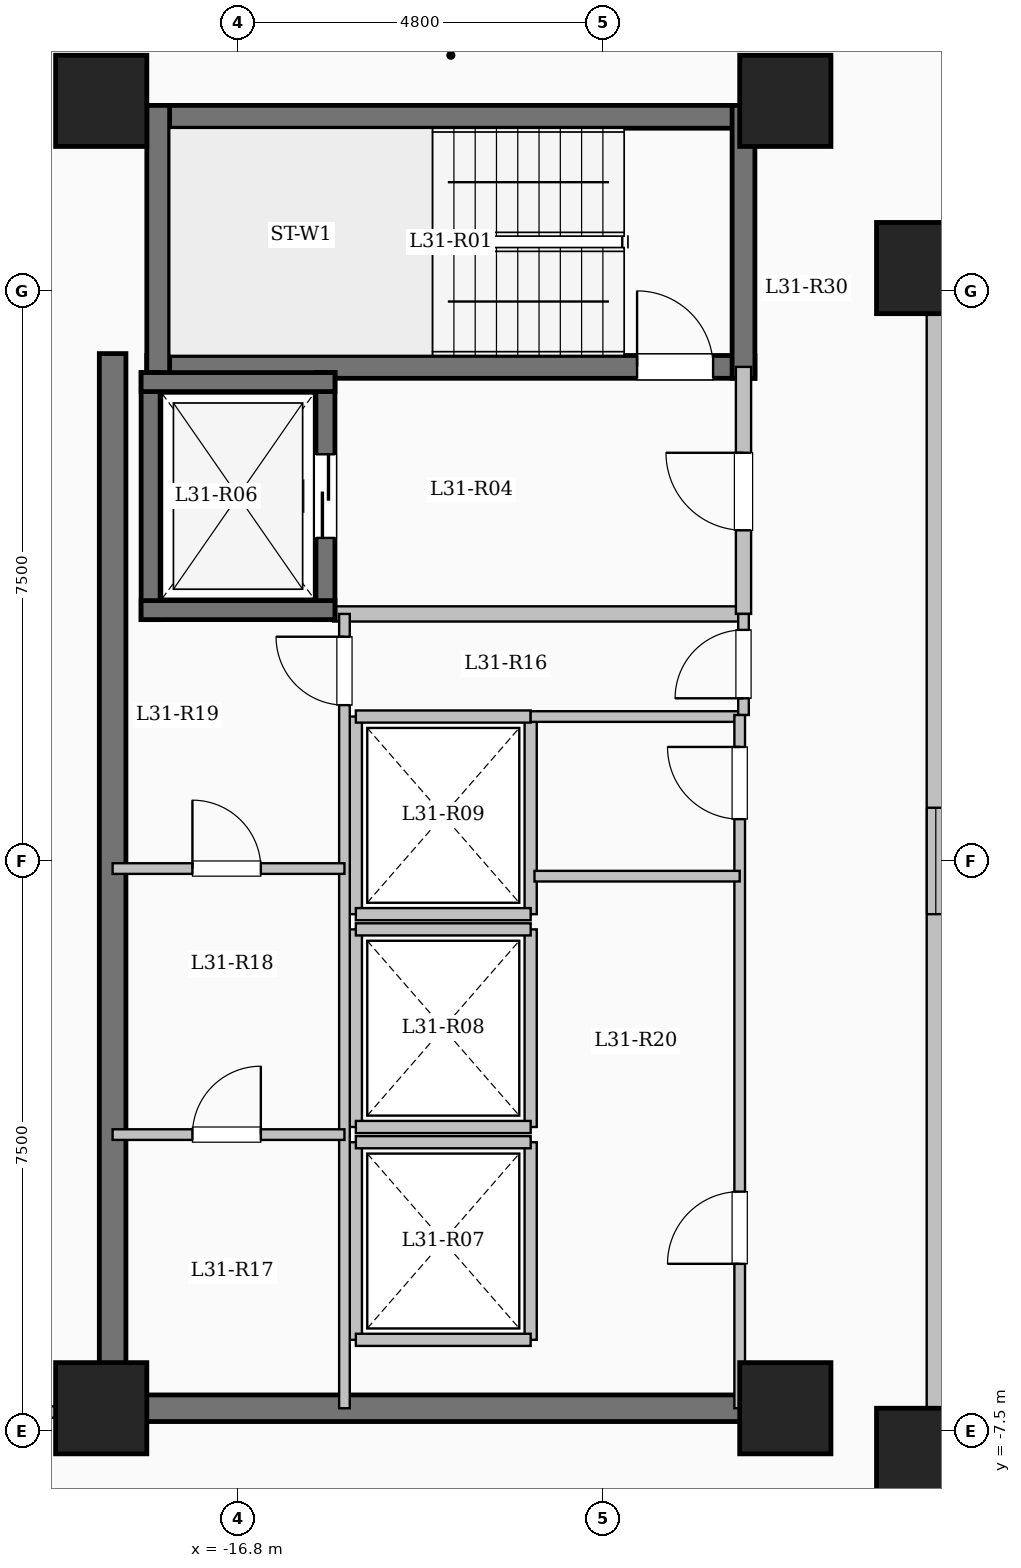
"""IFC4 building model, lengths in metres.
Left out: names, types, materials, properties, quantities, classifications, styles, units other than length and angle.
Written with IfcOpenShell. Run it as: python <this file> out.ifc"""

import sys

from ifc_helpers import new_model, si_unit, direction, frame, frame_2d, origin, origin_2d, place, context, subcontext, project, spatial, rectangle, extrude, element, fill, save


model = new_model("IFC4")
c1 = context("Model", 3, precision=1e-05, world=origin(), true_north=direction((0.0, 1.0)))
c2 = subcontext(c1, "Body", "Model", "MODEL_VIEW")
j1 = project(units=[si_unit("LENGTHUNIT", "METRE"), si_unit("PLANEANGLEUNIT", "RADIAN")], contexts=[c1])
p1 = place(None, origin())
s1 = spatial("IfcSite", under=j1, at=p1, CompositionType="ELEMENT")
p2 = place(p1, origin())
s2 = spatial("IfcBuilding", under=s1, at=p2, CompositionType="ELEMENT")
p3 = place(p2, frame((0.0, 0.0, 115.15)))
s3 = spatial("IfcBuildingStorey", under=s2, at=p3, CompositionType="ELEMENT", Elevation=115.15)
for number, where, z_axis, x_axis in (
    (1, (-7.8, -7.8, 0.0), (0.0, 0.0, 1.0), (1.0, 0.0, 0.0)),
    (2, (-7.8, 7.8, 0.0), (0.0, 0.0, 1.0), (1.0, 0.0, 0.0)),
    (3, (-9.6, -7.2, 0.0), (0.0, 0.0, 1.0), (1.0, 0.0, 0.0)),
    (4, (-9.6, 10.0, 0.0), (0.0, 0.0, 1.0), (1.0, 0.0, 0.0)),
    (5, (-18.6, -7.2, 0.0), (0.0, 0.0, 1.0), (1.0, 0.0, 0.0)),
    (6, (-18.6, 10.0, 0.0), (0.0, 0.0, 1.0), (1.0, 0.0, 0.0)),
):
    element("IfcColumn", number, at=place(p3, frame(where, z_axis=z_axis, x_axis=x_axis)), inside=s3, PredefinedType="COLUMN", context=c2, shape_type="SweptSolid", body=[
        extrude(rectangle(XDim=1.2, YDim=1.2, at=origin_2d()), origin(), (0.0, 0.0, 1.0), 3.35),
    ])
p4 = place(p3, frame((-7.62, -7.62, 0.0), z_axis=(0.0, 0.0, 1.0), x_axis=(1.0, 0.0, 0.0)))
e7 = element("IfcWall", 7, at=p4, inside=s3, PredefinedType="SOLIDWALL", context=c2, shape_type="SweptSolid", body=[
    extrude(rectangle(XDim=15.24, YDim=0.24, at=frame_2d((7.62, 0.0))), origin(), (0.0, 0.0, 1.0), 3.05),
])
p5 = place(p4, frame((6.92, 0.0, 0.95)))
e8 = element("IfcOpeningElement", 8, at=p5, cuts=e7, PredefinedType="OPENING", context=c2, shape_type="SweptSolid", body=[
    extrude(rectangle(XDim=1.4, YDim=1.5, at=frame_2d((0.7, 0.75))), frame((0.0, 0.13, 0.0), z_axis=(0.0, -1.0, 0.0), x_axis=(1.0, 0.0, 0.0)), (0.0, 0.0, 1.0), 0.26),
])
p6 = place(p3, frame((7.62, 7.62, 0.0), z_axis=(0.0, 0.0, 1.0), x_axis=(-1.0, 0.0, 0.0)))
e9 = element("IfcWall", 9, at=p6, inside=s3, PredefinedType="SOLIDWALL", context=c2, shape_type="SweptSolid", body=[
    extrude(rectangle(XDim=15.24, YDim=0.24, at=frame_2d((7.62, 0.0))), origin(), (0.0, 0.0, 1.0), 3.05),
])
p7 = place(p6, frame((6.92, 0.0, 0.95)))
e10 = element("IfcOpeningElement", 10, at=p7, cuts=e9, PredefinedType="OPENING", context=c2, shape_type="SweptSolid", body=[
    extrude(rectangle(XDim=1.4, YDim=1.5, at=frame_2d((0.7, 0.75))), frame((0.0, 0.13, 0.0), z_axis=(0.0, -1.0, 0.0), x_axis=(1.0, 0.0, 0.0)), (0.0, 0.0, 1.0), 0.26),
])
p8 = place(p3, frame((-7.62, 7.62, 0.0), z_axis=(0.0, 0.0, 1.0), x_axis=(0.0, -1.0, 0.0)))
e11 = element("IfcWall", 11, at=p8, inside=s3, PredefinedType="SOLIDWALL", context=c2, shape_type="SweptSolid", body=[
    extrude(rectangle(XDim=15.24, YDim=0.24, at=frame_2d((7.62, 0.0))), origin(), (0.0, 0.0, 1.0), 3.05),
])
p9 = place(p8, frame((6.92, 0.0, 0.95)))
e12 = element("IfcOpeningElement", 12, at=p9, cuts=e11, PredefinedType="OPENING", context=c2, shape_type="SweptSolid", body=[
    extrude(rectangle(XDim=1.4, YDim=1.5, at=frame_2d((0.7, 0.75))), frame((0.0, 0.13, 0.0), z_axis=(0.0, -1.0, 0.0), x_axis=(1.0, 0.0, 0.0)), (0.0, 0.0, 1.0), 0.26),
])
p10 = place(p3, frame((-18.0, 9.79, 0.0), z_axis=(0.0, 0.0, 1.0), x_axis=(1.0, 0.0, 0.0)))
e13 = element("IfcWall", 13, at=p10, inside=s3, PredefinedType="SHEAR", context=c2, shape_type="SweptSolid", body=[
    extrude(rectangle(XDim=8.0, YDim=0.3, at=frame_2d((4.0, 0.0))), origin(), (0.0, 0.0, 1.0), 3.35),
])
p11 = place(p3, frame((-18.0, 6.5, 0.0), z_axis=(0.0, 0.0, 1.0), x_axis=(1.0, 0.0, 0.0)))
e14 = element("IfcWall", 14, at=p11, inside=s3, PredefinedType="SHEAR", context=c2, shape_type="SweptSolid", body=[
    extrude(rectangle(XDim=8.0, YDim=0.3, at=frame_2d((4.0, 0.0))), origin(), (0.0, 0.0, 1.0), 3.35),
])
p12 = place(p11, frame((6.45, 0.0, 0.0)))
e15 = element("IfcOpeningElement", 15, at=p12, cuts=e14, PredefinedType="OPENING", context=c2, shape_type="SweptSolid", body=[
    extrude(rectangle(XDim=1.0, YDim=2.15, at=frame_2d((0.5, 1.075))), frame((0.0, 0.16, 0.0), z_axis=(0.0, -1.0, 0.0), x_axis=(1.0, 0.0, 0.0)), (0.0, 0.0, 1.0), 0.32),
])
for number, where, z_axis, x_axis in (
    (16, (-17.85, 6.35, 0.0), (0.0, 0.0, 1.0), (0.0, 1.0, 0.0)),
    (17, (-10.15, 6.35, 0.0), (0.0, 0.0, 1.0), (0.0, 1.0, 0.0)),
):
    element("IfcWall", number, at=place(p3, frame(where, z_axis=z_axis, x_axis=x_axis)), inside=s3, PredefinedType="SHEAR", context=c2, shape_type="SweptSolid", body=[
        extrude(rectangle(XDim=3.59, YDim=0.3, at=frame_2d((1.795, 0.0))), origin(), (0.0, 0.0, 1.0), 3.35),
    ])
p13 = place(p3, frame((-15.55, 3.25, 0.0), z_axis=(0.0, 0.0, 1.0), x_axis=(1.0, 0.0, 0.0)))
e18 = element("IfcWall", 18, at=p13, inside=s3, PredefinedType="SOLIDWALL", context=c2, shape_type="SweptSolid", body=[
    extrude(rectangle(XDim=5.4, YDim=0.2, at=frame_2d((2.7, 0.0))), origin(), (0.0, 0.0, 1.0), 3.05),
])
p14 = place(p3, frame((-10.15, 3.25, 0.0), z_axis=(0.0, 0.0, 1.0), x_axis=(0.0, 1.0, 0.0)))
e19 = element("IfcWall", 19, at=p14, inside=s3, PredefinedType="SOLIDWALL", context=c2, shape_type="SweptSolid", body=[
    extrude(rectangle(XDim=3.25, YDim=0.2, at=frame_2d((1.625, 0.0))), origin(), (0.0, 0.0, 1.0), 3.05),
])
p15 = place(p14, frame((1.1, 0.0, 0.0)))
e20 = element("IfcOpeningElement", 20, at=p15, cuts=e19, PredefinedType="OPENING", context=c2, shape_type="SweptSolid", body=[
    extrude(rectangle(XDim=1.02, YDim=2.15, at=frame_2d((0.51, 1.075))), frame((0.0, 0.11, 0.0), z_axis=(0.0, -1.0, 0.0), x_axis=(1.0, 0.0, 0.0)), (0.0, 0.0, 1.0), 0.22),
])
p16 = place(p3, frame((-17.95, 3.175, 0.0), z_axis=(0.0, 0.0, 1.0), x_axis=(0.0, 1.0, 0.0)))
e21 = element("IfcWall", 21, at=p16, inside=s3, PredefinedType="SHEAR", context=c2, shape_type="SweptSolid", body=[
    extrude(rectangle(XDim=3.25, YDim=0.25, at=frame_2d((1.625, 0.0))), origin(), (0.0, 0.0, 1.0), 3.35),
])
p17 = place(p3, frame((-15.65, 3.175, 0.0), z_axis=(0.0, 0.0, 1.0), x_axis=(0.0, 1.0, 0.0)))
e22 = element("IfcWall", 22, at=p17, inside=s3, PredefinedType="SHEAR", context=c2, shape_type="SweptSolid", body=[
    extrude(rectangle(XDim=3.25, YDim=0.25, at=frame_2d((1.625, 0.0))), origin(), (0.0, 0.0, 1.0), 3.35),
])
p18 = place(p17, frame((1.075, 0.0, 0.0)))
e23 = element("IfcOpeningElement", 23, at=p18, cuts=e22, PredefinedType="OPENING", context=c2, shape_type="SweptSolid", body=[
    extrude(rectangle(XDim=1.1, YDim=2.15, at=frame_2d((0.55, 1.075))), frame((0.0, 0.135, 0.0), z_axis=(0.0, -1.0, 0.0), x_axis=(1.0, 0.0, 0.0)), (0.0, 0.0, 1.0), 0.27),
])
for number, where, z_axis, x_axis in (
    (24, (-18.075, 3.3, 0.0), (0.0, 0.0, 1.0), (1.0, 0.0, 0.0)),
    (25, (-18.075, 6.3, 0.0), (0.0, 0.0, 1.0), (1.0, 0.0, 0.0)),
):
    element("IfcWall", number, at=place(p3, frame(where, z_axis=z_axis, x_axis=x_axis)), inside=s3, PredefinedType="SHEAR", context=c2, shape_type="SweptSolid", body=[
        extrude(rectangle(XDim=2.55, YDim=0.25, at=frame_2d((1.275, 0.0))), origin(), (0.0, 0.0, 1.0), 3.35),
    ])
for number, where, z_axis, x_axis in (
    (26, (-15.25, -6.3, 0.0), (0.0, 0.0, 1.0), (0.0, 1.0, 0.0)),
    (27, (-12.95, -6.3, 0.0), (0.0, 0.0, 1.0), (0.0, 1.0, 0.0)),
):
    element("IfcWall", number, at=place(p3, frame(where, z_axis=z_axis, x_axis=x_axis)), inside=s3, PredefinedType="SOLIDWALL", context=c2, shape_type="SweptSolid", body=[
        extrude(rectangle(XDim=2.6, YDim=0.16, at=frame_2d((1.3, 0.0))), origin(), (0.0, 0.0, 1.0), 3.05),
    ])
for number, where, z_axis, x_axis in (
    (28, (-15.25, -6.3, 0.0), (0.0, 0.0, 1.0), (1.0, 0.0, 0.0)),
    (29, (-15.25, -3.7, 0.0), (0.0, 0.0, 1.0), (1.0, 0.0, 0.0)),
):
    element("IfcWall", number, at=place(p3, frame(where, z_axis=z_axis, x_axis=x_axis)), inside=s3, PredefinedType="SOLIDWALL", context=c2, shape_type="SweptSolid", body=[
        extrude(rectangle(XDim=2.3, YDim=0.16, at=frame_2d((1.15, 0.0))), origin(), (0.0, 0.0, 1.0), 3.05),
    ])
for number, where, z_axis, x_axis in (
    (30, (-15.25, -3.5, 0.0), (0.0, 0.0, 1.0), (0.0, 1.0, 0.0)),
    (31, (-12.95, -3.5, 0.0), (0.0, 0.0, 1.0), (0.0, 1.0, 0.0)),
):
    element("IfcWall", number, at=place(p3, frame(where, z_axis=z_axis, x_axis=x_axis)), inside=s3, PredefinedType="SOLIDWALL", context=c2, shape_type="SweptSolid", body=[
        extrude(rectangle(XDim=2.6, YDim=0.16, at=frame_2d((1.3, 0.0))), origin(), (0.0, 0.0, 1.0), 3.05),
    ])
for number, where, z_axis, x_axis in (
    (32, (-15.25, -3.5, 0.0), (0.0, 0.0, 1.0), (1.0, 0.0, 0.0)),
    (33, (-15.25, -0.9, 0.0), (0.0, 0.0, 1.0), (1.0, 0.0, 0.0)),
):
    element("IfcWall", number, at=place(p3, frame(where, z_axis=z_axis, x_axis=x_axis)), inside=s3, PredefinedType="SOLIDWALL", context=c2, shape_type="SweptSolid", body=[
        extrude(rectangle(XDim=2.3, YDim=0.16, at=frame_2d((1.15, 0.0))), origin(), (0.0, 0.0, 1.0), 3.05),
    ])
for number, where, z_axis, x_axis in (
    (34, (-15.25, -0.7, 0.0), (0.0, 0.0, 1.0), (0.0, 1.0, 0.0)),
    (35, (-12.95, -0.7, 0.0), (0.0, 0.0, 1.0), (0.0, 1.0, 0.0)),
):
    element("IfcWall", number, at=place(p3, frame(where, z_axis=z_axis, x_axis=x_axis)), inside=s3, PredefinedType="SOLIDWALL", context=c2, shape_type="SweptSolid", body=[
        extrude(rectangle(XDim=2.6, YDim=0.16, at=frame_2d((1.3, 0.0))), origin(), (0.0, 0.0, 1.0), 3.05),
    ])
for number, where, z_axis, x_axis in (
    (36, (-15.25, -0.7, 0.0), (0.0, 0.0, 1.0), (1.0, 0.0, 0.0)),
    (37, (-15.25, 1.9, 0.0), (0.0, 0.0, 1.0), (1.0, 0.0, 0.0)),
):
    element("IfcWall", number, at=place(p3, frame(where, z_axis=z_axis, x_axis=x_axis)), inside=s3, PredefinedType="SOLIDWALL", context=c2, shape_type="SweptSolid", body=[
        extrude(rectangle(XDim=2.3, YDim=0.16, at=frame_2d((1.15, 0.0))), origin(), (0.0, 0.0, 1.0), 3.05),
    ])
p19 = place(p3, frame((-18.45, -7.375, 0.0), z_axis=(0.0, 0.0, 1.0), x_axis=(0.0, 1.0, 0.0)))
e38 = element("IfcWall", 38, at=p19, inside=s3, PredefinedType="SHEAR", context=c2, shape_type="SweptSolid", body=[
    extrude(rectangle(XDim=14.05, YDim=0.35, at=frame_2d((7.025, 0.0))), origin(), (0.0, 0.0, 1.0), 3.35),
])
p20 = place(p3, frame((-18.625, -7.2, 0.0), z_axis=(0.0, 0.0, 1.0), x_axis=(1.0, 0.0, 0.0)))
e39 = element("IfcWall", 39, at=p20, inside=s3, PredefinedType="SHEAR", context=c2, shape_type="SweptSolid", body=[
    extrude(rectangle(XDim=8.55, YDim=0.35, at=frame_2d((4.275, 0.0))), origin(), (0.0, 0.0, 1.0), 3.35),
])
p21 = place(p3, frame((-12.95, 1.9, 0.0), z_axis=(0.0, 0.0, 1.0), x_axis=(1.0, 0.0, 0.0)))
e40 = element("IfcWall", 40, at=p21, inside=s3, PredefinedType="PARTITIONING", context=c2, shape_type="SweptSolid", body=[
    extrude(rectangle(XDim=2.8, YDim=0.14, at=frame_2d((1.4, 0.0))), origin(), (0.0, 0.0, 1.0), 3.05),
])
p22 = place(p3, frame((-10.15, 1.92, 0.0), z_axis=(0.0, 0.0, 1.0), x_axis=(0.0, 1.0, 0.0)))
e41 = element("IfcWall", 41, at=p22, inside=s3, PredefinedType="PARTITIONING", context=c2, shape_type="SweptSolid", body=[
    extrude(rectangle(XDim=1.33, YDim=0.14, at=frame_2d((0.665, 0.0))), origin(), (0.0, 0.0, 1.0), 3.05),
])
p23 = place(p22, frame((0.22, 0.0, 0.0)))
e42 = element("IfcOpeningElement", 42, at=p23, cuts=e41, PredefinedType="OPENING", context=c2, shape_type="SweptSolid", body=[
    extrude(rectangle(XDim=0.9, YDim=2.08, at=frame_2d((0.45, 1.04))), frame((0.0, 0.08, 0.0), z_axis=(0.0, -1.0, 0.0), x_axis=(1.0, 0.0, 0.0)), (0.0, 0.0, 1.0), 0.16),
])
p24 = place(p3, frame((-15.4, -7.2, 0.0), z_axis=(0.0, 0.0, 1.0), x_axis=(0.0, 1.0, 0.0)))
e43 = element("IfcWall", 43, at=p24, inside=s3, PredefinedType="PARTITIONING", context=c2, shape_type="SweptSolid", body=[
    extrude(rectangle(XDim=10.45, YDim=0.14, at=frame_2d((5.225, 0.0))), origin(), (0.0, 0.0, 1.0), 3.05),
])
p25 = place(p24, frame((9.25, 0.0, 0.0)))
e44 = element("IfcOpeningElement", 44, at=p25, cuts=e43, PredefinedType="OPENING", context=c2, shape_type="SweptSolid", body=[
    extrude(rectangle(XDim=0.9, YDim=2.08, at=frame_2d((0.45, 1.04))), frame((0.0, 0.08, 0.0), z_axis=(0.0, -1.0, 0.0), x_axis=(1.0, 0.0, 0.0)), (0.0, 0.0, 1.0), 0.16),
])
p26 = place(p3, frame((-18.45, -3.6, 0.0), z_axis=(0.0, 0.0, 1.0), x_axis=(1.0, 0.0, 0.0)))
e45 = element("IfcWall", 45, at=p26, inside=s3, PredefinedType="PARTITIONING", context=c2, shape_type="SweptSolid", body=[
    extrude(rectangle(XDim=3.05, YDim=0.14, at=frame_2d((1.525, 0.0))), origin(), (0.0, 0.0, 1.0), 3.05),
])
p27 = place(p26, frame((1.05, 0.0, 0.0)))
e46 = element("IfcOpeningElement", 46, at=p27, cuts=e45, PredefinedType="OPENING", context=c2, shape_type="SweptSolid", body=[
    extrude(rectangle(XDim=0.9, YDim=2.08, at=frame_2d((0.45, 1.04))), frame((0.0, 0.08, 0.0), z_axis=(0.0, -1.0, 0.0), x_axis=(1.0, 0.0, 0.0)), (0.0, 0.0, 1.0), 0.16),
])
p28 = place(p3, frame((-18.45, -0.1, 0.0), z_axis=(0.0, 0.0, 1.0), x_axis=(1.0, 0.0, 0.0)))
e47 = element("IfcWall", 47, at=p28, inside=s3, PredefinedType="PARTITIONING", context=c2, shape_type="SweptSolid", body=[
    extrude(rectangle(XDim=3.05, YDim=0.14, at=frame_2d((1.525, 0.0))), origin(), (0.0, 0.0, 1.0), 3.05),
])
p29 = place(p28, frame((1.05, 0.0, 0.0)))
e48 = element("IfcOpeningElement", 48, at=p29, cuts=e47, PredefinedType="OPENING", context=c2, shape_type="SweptSolid", body=[
    extrude(rectangle(XDim=0.9, YDim=2.08, at=frame_2d((0.45, 1.04))), frame((0.0, 0.08, 0.0), z_axis=(0.0, -1.0, 0.0), x_axis=(1.0, 0.0, 0.0)), (0.0, 0.0, 1.0), 0.16),
])
p30 = place(p3, frame((-10.2, -7.2, 0.0), z_axis=(0.0, 0.0, 1.0), x_axis=(0.0, 1.0, 0.0)))
e49 = element("IfcWall", 49, at=p30, inside=s3, PredefinedType="PARTITIONING", context=c2, shape_type="SweptSolid", body=[
    extrude(rectangle(XDim=9.12, YDim=0.14, at=frame_2d((4.56, 0.0))), origin(), (0.0, 0.0, 1.0), 3.05),
])
p31 = place(p30, frame((1.9, 0.0, 0.0)))
e50 = element("IfcOpeningElement", 50, at=p31, cuts=e49, PredefinedType="OPENING", context=c2, shape_type="SweptSolid", body=[
    extrude(rectangle(XDim=0.95, YDim=2.12, at=frame_2d((0.475, 1.06))), frame((0.0, 0.08, 0.0), z_axis=(0.0, -1.0, 0.0), x_axis=(1.0, 0.0, 0.0)), (0.0, 0.0, 1.0), 0.16),
])
p32 = place(p30, frame((7.75, 0.0, 0.0)))
e51 = element("IfcOpeningElement", 51, at=p32, cuts=e49, PredefinedType="OPENING", context=c2, shape_type="SweptSolid", body=[
    extrude(rectangle(XDim=0.95, YDim=2.12, at=frame_2d((0.475, 1.06))), frame((0.0, 0.08, 0.0), z_axis=(0.0, -1.0, 0.0), x_axis=(1.0, 0.0, 0.0)), (0.0, 0.0, 1.0), 0.16),
])
p33 = place(p3, frame((-12.9, -0.2, 0.0), z_axis=(0.0, 0.0, 1.0), x_axis=(1.0, 0.0, 0.0)))
e52 = element("IfcWall", 52, at=p33, inside=s3, PredefinedType="PARTITIONING", context=c2, shape_type="SweptSolid", body=[
    extrude(rectangle(XDim=2.7, YDim=0.14, at=frame_2d((1.35, 0.0))), origin(), (0.0, 0.0, 1.0), 3.05),
])
p34 = place(p3, frame((-26.88, -7.25, 0.0), z_axis=(0.0, 0.0, 1.0), x_axis=(1.0, 0.0, 0.0)))
e53 = element("IfcWall", 53, at=p34, inside=s3, PredefinedType="PARTITIONING", context=c2, shape_type="SweptSolid", body=[
    extrude(rectangle(XDim=8.43, YDim=0.15, at=frame_2d((4.215, 0.0))), origin(), (0.0, 0.0, 1.0), 3.05),
])
p35 = place(p34, frame((5.23, 0.0, 0.0)))
e54 = element("IfcOpeningElement", 54, at=p35, cuts=e53, PredefinedType="OPENING", context=c2, shape_type="SweptSolid", body=[
    extrude(rectangle(XDim=1.08, YDim=2.15, at=frame_2d((0.54, 1.075))), frame((0.0, 0.085, 0.0), z_axis=(0.0, -1.0, 0.0), x_axis=(1.0, 0.0, 0.0)), (0.0, 0.0, 1.0), 0.17),
])
p36 = place(p9, origin())
e55 = element("IfcWindow", 55, at=p36, inside=s3, PartitioningType="SINGLE_PANEL", PredefinedType="WINDOW", context=c2, shape_type="SweptSolid", body=[
    extrude(rectangle(XDim=1.4, YDim=1.5, at=frame_2d((0.7, 0.75))), frame((0.0, 0.03, 0.0), z_axis=(0.0, -1.0, 0.0), x_axis=(1.0, 0.0, 0.0)), (0.0, 0.0, 1.0), 0.06),
])
fill(e12, e55)
p37 = place(p12, origin())
e56 = element("IfcDoor", 56, at=p37, inside=s3, OperationType="SINGLE_SWING_LEFT", PredefinedType="DOOR", context=c2, shape_type="SweptSolid", body=[
    extrude(rectangle(XDim=1.0, YDim=2.15, at=frame_2d((0.5, 1.075))), frame((0.0, 0.025, 0.0), z_axis=(0.0, -1.0, 0.0), x_axis=(1.0, 0.0, 0.0)), (0.0, 0.0, 1.0), 0.05),
])
fill(e15, e56)
p38 = place(p15, origin())
e57 = element("IfcDoor", 57, at=p38, inside=s3, OperationType="SINGLE_SWING_RIGHT", PredefinedType="DOOR", context=c2, shape_type="SweptSolid", body=[
    extrude(rectangle(XDim=1.02, YDim=2.15, at=frame_2d((0.51, 1.075))), frame((0.0, 0.025, 0.0), z_axis=(0.0, -1.0, 0.0), x_axis=(1.0, 0.0, 0.0)), (0.0, 0.0, 1.0), 0.05),
])
fill(e20, e57)
p39 = place(p18, origin())
e58 = element("IfcDoor", 58, at=p39, inside=s3, OperationType="SLIDING_TO_LEFT", PredefinedType="DOOR", context=c2, shape_type="SweptSolid", body=[
    extrude(rectangle(XDim=1.1, YDim=2.15, at=frame_2d((0.55, 1.075))), frame((0.0, 0.025, 0.0), z_axis=(0.0, -1.0, 0.0), x_axis=(1.0, 0.0, 0.0)), (0.0, 0.0, 1.0), 0.05),
])
fill(e23, e58)
p40 = place(p23, origin())
e59 = element("IfcDoor", 59, at=p40, inside=s3, OperationType="SINGLE_SWING_LEFT", PredefinedType="DOOR", context=c2, shape_type="SweptSolid", body=[
    extrude(rectangle(XDim=0.9, YDim=2.08, at=frame_2d((0.45, 1.04))), frame((0.0, 0.025, 0.0), z_axis=(0.0, -1.0, 0.0), x_axis=(1.0, 0.0, 0.0)), (0.0, 0.0, 1.0), 0.05),
])
fill(e42, e59)
p41 = place(p25, origin())
e60 = element("IfcDoor", 60, at=p41, inside=s3, OperationType="SINGLE_SWING_RIGHT", PredefinedType="DOOR", context=c2, shape_type="SweptSolid", body=[
    extrude(rectangle(XDim=0.9, YDim=2.08, at=frame_2d((0.45, 1.04))), frame((0.0, 0.025, 0.0), z_axis=(0.0, -1.0, 0.0), x_axis=(1.0, 0.0, 0.0)), (0.0, 0.0, 1.0), 0.05),
])
fill(e44, e60)
p42 = place(p29, origin())
e61 = element("IfcDoor", 61, at=p42, inside=s3, OperationType="SINGLE_SWING_LEFT", PredefinedType="DOOR", context=c2, shape_type="SweptSolid", body=[
    extrude(rectangle(XDim=0.9, YDim=2.08, at=frame_2d((0.45, 1.04))), frame((0.0, 0.025, 0.0), z_axis=(0.0, -1.0, 0.0), x_axis=(1.0, 0.0, 0.0)), (0.0, 0.0, 1.0), 0.05),
])
fill(e48, e61)
p43 = place(p27, origin())
e62 = element("IfcDoor", 62, at=p43, inside=s3, OperationType="SINGLE_SWING_RIGHT", PredefinedType="DOOR", context=c2, shape_type="SweptSolid", body=[
    extrude(rectangle(XDim=0.9, YDim=2.08, at=frame_2d((0.45, 1.04))), frame((0.0, 0.025, 0.0), z_axis=(0.0, -1.0, 0.0), x_axis=(1.0, 0.0, 0.0)), (0.0, 0.0, 1.0), 0.05),
])
fill(e46, e62)
p44 = place(p31, origin())
e63 = element("IfcDoor", 63, at=p44, inside=s3, OperationType="SINGLE_SWING_LEFT", PredefinedType="DOOR", context=c2, shape_type="SweptSolid", body=[
    extrude(rectangle(XDim=0.95, YDim=2.12, at=frame_2d((0.475, 1.06))), frame((0.0, 0.025, 0.0), z_axis=(0.0, -1.0, 0.0), x_axis=(1.0, 0.0, 0.0)), (0.0, 0.0, 1.0), 0.05),
])
fill(e50, e63)
p45 = place(p32, origin())
e64 = element("IfcDoor", 64, at=p45, inside=s3, OperationType="SINGLE_SWING_RIGHT", PredefinedType="DOOR", context=c2, shape_type="SweptSolid", body=[
    extrude(rectangle(XDim=0.95, YDim=2.12, at=frame_2d((0.475, 1.06))), frame((0.0, 0.025, 0.0), z_axis=(0.0, -1.0, 0.0), x_axis=(1.0, 0.0, 0.0)), (0.0, 0.0, 1.0), 0.05),
])
fill(e51, e64)
save(model, sys.argv[1])
